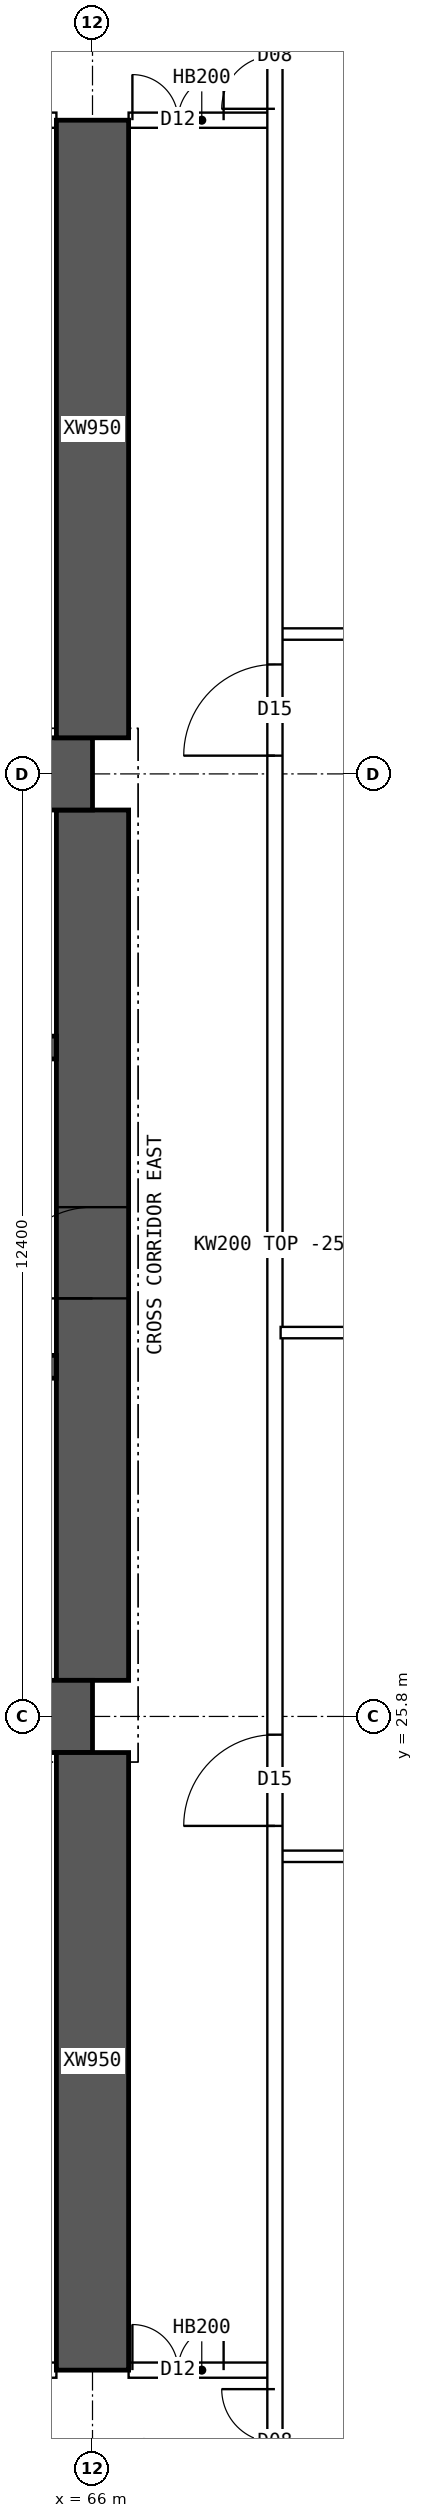
"""IFC4 building model, lengths in metres.
Left out: names, types, materials, properties, quantities, classifications, styles, units other than length and angle.
Written with IfcOpenShell. Run it as: python <this file> out.ifc"""

import sys

from ifc_helpers import new_model, si_unit, direction, frame, frame_2d, origin, place, context, subcontext, project, spatial, polyline, rectangle, outline, extrude, element, fill, save


model = new_model("IFC4")
c1 = context("Model", 3, precision=1e-05, world=origin(), true_north=direction((0.0, 1.0)))
c2 = subcontext(c1, "Body", "Model", "MODEL_VIEW")
j1 = project(units=[si_unit("LENGTHUNIT", "METRE"), si_unit("PLANEANGLEUNIT", "RADIAN")], contexts=[c1])
p1 = place(None, origin())
s1 = spatial("IfcSite", under=j1, at=p1, CompositionType="ELEMENT")
p2 = place(p1, origin())
s2 = spatial("IfcBuilding", under=s1, at=p2, CompositionType="ELEMENT")
p3 = place(p2, frame((0.0, 0.0, 140.35)))
s3 = spatial("IfcBuildingStorey", under=s2, at=p3, CompositionType="ELEMENT", Elevation=140.35)
for number, where, z_axis, x_axis in (
    (1, (18.0, 25.8, 0.0), (0.0, 0.0, 1.0), (1.0, 0.0, 0.0)),
    (2, (18.0, 38.2, 0.0), (0.0, 0.0, 1.0), (1.0, 0.0, 0.0)),
):
    element("IfcWall", number, at=place(p3, frame(where, z_axis=z_axis, x_axis=x_axis)), inside=s3, PredefinedType="SHEAR", context=c2, shape_type="SweptSolid", body=[
        extrude(rectangle(XDim=48.0, YDim=0.95, at=frame_2d((24.0, 0.0))), origin(), (0.0, 0.0, 1.0), 4.5),
    ])
p4 = place(p3, frame((66.0, 26.275, 0.0), z_axis=(0.0, 0.0, 1.0), x_axis=(0.0, 1.0, 0.0)))
e3 = element("IfcWall", 3, at=p4, inside=s3, PredefinedType="SHEAR", context=c2, shape_type="SweptSolid", body=[
    extrude(rectangle(XDim=11.45, YDim=0.95, at=frame_2d((5.725, 0.0))), origin(), (0.0, 0.0, 1.0), 4.5),
])
p5 = place(p4, frame((5.025, 0.0, 0.0)))
e4 = element("IfcOpeningElement", 4, at=p5, cuts=e3, PredefinedType="OPENING", context=c2, shape_type="SweptSolid", body=[
    extrude(rectangle(XDim=1.2, YDim=2.1, at=frame_2d((0.6, 1.05))), frame((0.0, 0.485, 0.0), z_axis=(0.0, -1.0, 0.0), x_axis=(1.0, 0.0, 0.0)), (0.0, 0.0, 1.0), 0.97),
])
p6 = place(p3, frame((18.475, 30.4, 0.0), z_axis=(0.0, 0.0, 1.0), x_axis=(1.0, 0.0, 0.0)))
e5 = element("IfcWall", 5, at=p6, inside=s3, PredefinedType="SHEAR", context=c2, shape_type="SweptSolid", body=[
    extrude(rectangle(XDim=47.05, YDim=0.3, at=frame_2d((23.525, 0.0))), origin(), (0.0, 0.0, 1.0), 4.5),
])
p7 = place(p6, frame((0.4, 0.0, 0.0)))
e6 = element("IfcOpeningElement", 6, at=p7, cuts=e5, PredefinedType="OPENING", context=c2, shape_type="SweptSolid", body=[
    extrude(rectangle(XDim=1.0, YDim=2.1, at=frame_2d((0.5, 1.05))), frame((0.0, 0.16, 0.0), z_axis=(0.0, -1.0, 0.0), x_axis=(1.0, 0.0, 0.0)), (0.0, 0.0, 1.0), 0.32),
])
p8 = place(p6, frame((45.65, 0.0, 0.0)))
e7 = element("IfcOpeningElement", 7, at=p8, cuts=e5, PredefinedType="OPENING", context=c2, shape_type="SweptSolid", body=[
    extrude(rectangle(XDim=1.0, YDim=2.1, at=frame_2d((0.5, 1.05))), frame((0.0, 0.16, 0.0), z_axis=(0.0, -1.0, 0.0), x_axis=(1.0, 0.0, 0.0)), (0.0, 0.0, 1.0), 0.32),
])
p9 = place(p6, frame((8.275, 0.0, 0.0)))
e8 = element("IfcOpeningElement", 8, at=p9, cuts=e5, PredefinedType="OPENING", context=c2, shape_type="SweptSolid", body=[
    extrude(rectangle(XDim=1.1, YDim=2.1, at=frame_2d((0.55, 1.05))), frame((0.0, 0.16, 0.0), z_axis=(0.0, -1.0, 0.0), x_axis=(1.0, 0.0, 0.0)), (0.0, 0.0, 1.0), 0.32),
])
p10 = place(p6, frame((10.875, 0.0, 0.0)))
e9 = element("IfcOpeningElement", 9, at=p10, cuts=e5, PredefinedType="OPENING", context=c2, shape_type="SweptSolid", body=[
    extrude(rectangle(XDim=1.1, YDim=2.1, at=frame_2d((0.55, 1.05))), frame((0.0, 0.16, 0.0), z_axis=(0.0, -1.0, 0.0), x_axis=(1.0, 0.0, 0.0)), (0.0, 0.0, 1.0), 0.32),
])
p11 = place(p6, frame((13.475, 0.0, 0.0)))
e10 = element("IfcOpeningElement", 10, at=p11, cuts=e5, PredefinedType="OPENING", context=c2, shape_type="SweptSolid", body=[
    extrude(rectangle(XDim=1.1, YDim=2.1, at=frame_2d((0.55, 1.05))), frame((0.0, 0.16, 0.0), z_axis=(0.0, -1.0, 0.0), x_axis=(1.0, 0.0, 0.0)), (0.0, 0.0, 1.0), 0.32),
])
p12 = place(p6, frame((16.075, 0.0, 0.0)))
e11 = element("IfcOpeningElement", 11, at=p12, cuts=e5, PredefinedType="OPENING", context=c2, shape_type="SweptSolid", body=[
    extrude(rectangle(XDim=1.1, YDim=2.1, at=frame_2d((0.55, 1.05))), frame((0.0, 0.16, 0.0), z_axis=(0.0, -1.0, 0.0), x_axis=(1.0, 0.0, 0.0)), (0.0, 0.0, 1.0), 0.32),
])
p13 = place(p6, frame((18.85, 0.0, 0.0)))
e12 = element("IfcOpeningElement", 12, at=p13, cuts=e5, PredefinedType="OPENING", context=c2, shape_type="SweptSolid", body=[
    extrude(rectangle(XDim=0.9, YDim=2.1, at=frame_2d((0.45, 1.05))), frame((0.0, 0.16, 0.0), z_axis=(0.0, -1.0, 0.0), x_axis=(1.0, 0.0, 0.0)), (0.0, 0.0, 1.0), 0.32),
])
p14 = place(p6, frame((21.5, 0.0, 0.0)))
e13 = element("IfcOpeningElement", 13, at=p14, cuts=e5, PredefinedType="OPENING", context=c2, shape_type="SweptSolid", body=[
    extrude(rectangle(XDim=1.1, YDim=2.1, at=frame_2d((0.55, 1.05))), frame((0.0, 0.16, 0.0), z_axis=(0.0, -1.0, 0.0), x_axis=(1.0, 0.0, 0.0)), (0.0, 0.0, 1.0), 0.32),
])
p15 = place(p6, frame((30.142, 0.0, 0.0)))
e14 = element("IfcOpeningElement", 14, at=p15, cuts=e5, PredefinedType="OPENING", context=c2, shape_type="SweptSolid", body=[
    extrude(rectangle(XDim=1.1, YDim=2.1, at=frame_2d((0.55, 1.05))), frame((0.0, 0.16, 0.0), z_axis=(0.0, -1.0, 0.0), x_axis=(1.0, 0.0, 0.0)), (0.0, 0.0, 1.0), 0.32),
])
p16 = place(p6, frame((33.675, 0.0, 0.0)))
e15 = element("IfcOpeningElement", 15, at=p16, cuts=e5, PredefinedType="OPENING", context=c2, shape_type="SweptSolid", body=[
    extrude(rectangle(XDim=1.1, YDim=2.1, at=frame_2d((0.55, 1.05))), frame((0.0, 0.16, 0.0), z_axis=(0.0, -1.0, 0.0), x_axis=(1.0, 0.0, 0.0)), (0.0, 0.0, 1.0), 0.32),
])
p17 = place(p6, frame((37.208, 0.0, 0.0)))
e16 = element("IfcOpeningElement", 16, at=p17, cuts=e5, PredefinedType="OPENING", context=c2, shape_type="SweptSolid", body=[
    extrude(rectangle(XDim=1.1, YDim=2.1, at=frame_2d((0.55, 1.05))), frame((0.0, 0.16, 0.0), z_axis=(0.0, -1.0, 0.0), x_axis=(1.0, 0.0, 0.0)), (0.0, 0.0, 1.0), 0.32),
])
p18 = place(p3, frame((18.475, 34.6, 0.0), z_axis=(0.0, 0.0, 1.0), x_axis=(1.0, 0.0, 0.0)))
e17 = element("IfcWall", 17, at=p18, inside=s3, PredefinedType="SHEAR", context=c2, shape_type="SweptSolid", body=[
    extrude(rectangle(XDim=47.05, YDim=0.3, at=frame_2d((23.525, 0.0))), origin(), (0.0, 0.0, 1.0), 4.5),
])
p19 = place(p18, frame((0.9, 0.0, 0.0)))
e18 = element("IfcOpeningElement", 18, at=p19, cuts=e17, PredefinedType="OPENING", context=c2, shape_type="SweptSolid", body=[
    extrude(rectangle(XDim=1.1, YDim=2.1, at=frame_2d((0.55, 1.05))), frame((0.0, 0.16, 0.0), z_axis=(0.0, -1.0, 0.0), x_axis=(1.0, 0.0, 0.0)), (0.0, 0.0, 1.0), 0.32),
])
p20 = place(p18, frame((45.05, 0.0, 0.0)))
e19 = element("IfcOpeningElement", 19, at=p20, cuts=e17, PredefinedType="OPENING", context=c2, shape_type="SweptSolid", body=[
    extrude(rectangle(XDim=1.1, YDim=2.1, at=frame_2d((0.55, 1.05))), frame((0.0, 0.16, 0.0), z_axis=(0.0, -1.0, 0.0), x_axis=(1.0, 0.0, 0.0)), (0.0, 0.0, 1.0), 0.32),
])
p21 = place(p18, frame((4.125, 0.0, 0.0)))
e20 = element("IfcOpeningElement", 20, at=p21, cuts=e17, PredefinedType="OPENING", context=c2, shape_type="SweptSolid", body=[
    extrude(rectangle(XDim=0.9, YDim=2.1, at=frame_2d((0.45, 1.05))), frame((0.0, 0.16, 0.0), z_axis=(0.0, -1.0, 0.0), x_axis=(1.0, 0.0, 0.0)), (0.0, 0.0, 1.0), 0.32),
])
p22 = place(p18, frame((42.025, 0.0, 0.0)))
e21 = element("IfcOpeningElement", 21, at=p22, cuts=e17, PredefinedType="OPENING", context=c2, shape_type="SweptSolid", body=[
    extrude(rectangle(XDim=0.9, YDim=2.1, at=frame_2d((0.45, 1.05))), frame((0.0, 0.16, 0.0), z_axis=(0.0, -1.0, 0.0), x_axis=(1.0, 0.0, 0.0)), (0.0, 0.0, 1.0), 0.32),
])
p23 = place(p18, frame((8.9, 0.0, 0.0)))
e22 = element("IfcOpeningElement", 22, at=p23, cuts=e17, PredefinedType="OPENING", context=c2, shape_type="SweptSolid", body=[
    extrude(rectangle(XDim=0.9, YDim=2.1, at=frame_2d((0.45, 1.05))), frame((0.0, 0.16, 0.0), z_axis=(0.0, -1.0, 0.0), x_axis=(1.0, 0.0, 0.0)), (0.0, 0.0, 1.0), 0.32),
])
p24 = place(p18, frame((12.874, 0.0, 0.0)))
e23 = element("IfcOpeningElement", 23, at=p24, cuts=e17, PredefinedType="OPENING", context=c2, shape_type="SweptSolid", body=[
    extrude(rectangle(XDim=0.9, YDim=2.1, at=frame_2d((0.45, 1.05))), frame((0.0, 0.16, 0.0), z_axis=(0.0, -1.0, 0.0), x_axis=(1.0, 0.0, 0.0)), (0.0, 0.0, 1.0), 0.32),
])
p25 = place(p18, frame((16.521, 0.0, 0.0)))
e24 = element("IfcOpeningElement", 24, at=p25, cuts=e17, PredefinedType="OPENING", context=c2, shape_type="SweptSolid", body=[
    extrude(rectangle(XDim=0.9, YDim=2.1, at=frame_2d((0.45, 1.05))), frame((0.0, 0.16, 0.0), z_axis=(0.0, -1.0, 0.0), x_axis=(1.0, 0.0, 0.0)), (0.0, 0.0, 1.0), 0.32),
])
p26 = place(p18, frame((20.28, 0.0, 0.0)))
e25 = element("IfcOpeningElement", 25, at=p26, cuts=e17, PredefinedType="OPENING", context=c2, shape_type="SweptSolid", body=[
    extrude(rectangle(XDim=0.9, YDim=2.1, at=frame_2d((0.45, 1.05))), frame((0.0, 0.16, 0.0), z_axis=(0.0, -1.0, 0.0), x_axis=(1.0, 0.0, 0.0)), (0.0, 0.0, 1.0), 0.32),
])
p27 = place(p18, frame((24.686, 0.0, 0.0)))
e26 = element("IfcOpeningElement", 26, at=p27, cuts=e17, PredefinedType="OPENING", context=c2, shape_type="SweptSolid", body=[
    extrude(rectangle(XDim=0.9, YDim=2.1, at=frame_2d((0.45, 1.05))), frame((0.0, 0.16, 0.0), z_axis=(0.0, -1.0, 0.0), x_axis=(1.0, 0.0, 0.0)), (0.0, 0.0, 1.0), 0.32),
])
p28 = place(p18, frame((27.483, 0.0, 0.0)))
e27 = element("IfcOpeningElement", 27, at=p28, cuts=e17, PredefinedType="OPENING", context=c2, shape_type="SweptSolid", body=[
    extrude(rectangle(XDim=0.9, YDim=2.1, at=frame_2d((0.45, 1.05))), frame((0.0, 0.16, 0.0), z_axis=(0.0, -1.0, 0.0), x_axis=(1.0, 0.0, 0.0)), (0.0, 0.0, 1.0), 0.32),
])
p29 = place(p18, frame((30.666, 0.0, 0.0)))
e28 = element("IfcOpeningElement", 28, at=p29, cuts=e17, PredefinedType="OPENING", context=c2, shape_type="SweptSolid", body=[
    extrude(rectangle(XDim=0.9, YDim=2.1, at=frame_2d((0.45, 1.05))), frame((0.0, 0.16, 0.0), z_axis=(0.0, -1.0, 0.0), x_axis=(1.0, 0.0, 0.0)), (0.0, 0.0, 1.0), 0.32),
])
p30 = place(p18, frame((34.617, 0.0, 0.0)))
e29 = element("IfcOpeningElement", 29, at=p30, cuts=e17, PredefinedType="OPENING", context=c2, shape_type="SweptSolid", body=[
    extrude(rectangle(XDim=0.9, YDim=2.1, at=frame_2d((0.45, 1.05))), frame((0.0, 0.16, 0.0), z_axis=(0.0, -1.0, 0.0), x_axis=(1.0, 0.0, 0.0)), (0.0, 0.0, 1.0), 0.32),
])
p31 = place(p18, frame((37.555, 0.0, 0.0)))
e30 = element("IfcOpeningElement", 30, at=p31, cuts=e17, PredefinedType="OPENING", context=c2, shape_type="SweptSolid", body=[
    extrude(rectangle(XDim=0.9, YDim=2.1, at=frame_2d((0.45, 1.05))), frame((0.0, 0.16, 0.0), z_axis=(0.0, -1.0, 0.0), x_axis=(1.0, 0.0, 0.0)), (0.0, 0.0, 1.0), 0.32),
])
for number, where, z_axis, x_axis in (
    (31, (66.0, 17.2, 0.0), (0.0, 0.0, 1.0), (0.0, 1.0, 0.0)),
    (32, (66.0, 38.675, 0.0), (0.0, 0.0, 1.0), (0.0, 1.0, 0.0)),
):
    element("IfcWall", number, at=place(p3, frame(where, z_axis=z_axis, x_axis=x_axis)), inside=s3, PredefinedType="SHEAR", context=c2, shape_type="SweptSolid", body=[
        extrude(rectangle(XDim=8.125, YDim=0.95, at=frame_2d((4.062, 0.0))), origin(), (0.0, 0.0, 1.0), 4.5),
    ])
p32 = place(p3, frame((60.475, 17.2, 0.0), z_axis=(0.0, 0.0, 1.0), x_axis=(1.0, 0.0, 0.0)))
e33 = element("IfcWall", 33, at=p32, inside=s3, PredefinedType="SOLIDWALL", context=c2, shape_type="SweptSolid", body=[
    extrude(rectangle(XDim=5.05, YDim=0.2, at=frame_2d((2.525, 0.0))), origin(), (0.0, 0.0, 1.0), 4.25),
])
p33 = place(p32, frame((0.4, 0.0, 0.0)))
e34 = element("IfcOpeningElement", 34, at=p33, cuts=e33, PredefinedType="OPENING", context=c2, shape_type="SweptSolid", body=[
    extrude(rectangle(XDim=1.0, YDim=2.1, at=frame_2d((0.5, 1.05))), frame((0.0, 0.11, 0.0), z_axis=(0.0, -1.0, 0.0), x_axis=(1.0, 0.0, 0.0)), (0.0, 0.0, 1.0), 0.22),
])
p34 = place(p3, frame((66.475, 17.2, 0.0), z_axis=(0.0, 0.0, 1.0), x_axis=(1.0, 0.0, 0.0)))
e35 = element("IfcWall", 35, at=p34, inside=s3, PredefinedType="SOLIDWALL", context=c2, shape_type="SweptSolid", body=[
    extrude(rectangle(XDim=1.925, YDim=0.2, at=frame_2d((0.962, 0.0))), origin(), (0.0, 0.0, 1.0), 4.25),
])
p35 = place(p34, frame((0.05, 0.0, 0.0)))
e36 = element("IfcOpeningElement", 36, at=p35, cuts=e35, PredefinedType="OPENING", context=c2, shape_type="SweptSolid", body=[
    extrude(rectangle(XDim=1.2, YDim=2.1, at=frame_2d((0.6, 1.05))), frame((0.0, 0.11, 0.0), z_axis=(0.0, -1.0, 0.0), x_axis=(1.0, 0.0, 0.0)), (0.0, 0.0, 1.0), 0.22),
])
p36 = place(p3, frame((60.475, 46.8, 0.0), z_axis=(0.0, 0.0, 1.0), x_axis=(1.0, 0.0, 0.0)))
e37 = element("IfcWall", 37, at=p36, inside=s3, PredefinedType="SOLIDWALL", context=c2, shape_type="SweptSolid", body=[
    extrude(rectangle(XDim=5.05, YDim=0.2, at=frame_2d((2.525, 0.0))), origin(), (0.0, 0.0, 1.0), 4.25),
])
p37 = place(p36, frame((0.15, 0.0, 0.0)))
e38 = element("IfcOpeningElement", 38, at=p37, cuts=e37, PredefinedType="OPENING", context=c2, shape_type="SweptSolid", body=[
    extrude(rectangle(XDim=0.9, YDim=2.1, at=frame_2d((0.45, 1.05))), frame((0.0, 0.11, 0.0), z_axis=(0.0, -1.0, 0.0), x_axis=(1.0, 0.0, 0.0)), (0.0, 0.0, 1.0), 0.22),
])
p38 = place(p36, frame((3.185, 0.0, 0.0)))
e39 = element("IfcOpeningElement", 39, at=p38, cuts=e37, PredefinedType="OPENING", context=c2, shape_type="SweptSolid", body=[
    extrude(rectangle(XDim=0.9, YDim=2.1, at=frame_2d((0.45, 1.05))), frame((0.0, 0.11, 0.0), z_axis=(0.0, -1.0, 0.0), x_axis=(1.0, 0.0, 0.0)), (0.0, 0.0, 1.0), 0.22),
])
p39 = place(p3, frame((66.475, 46.8, 0.0), z_axis=(0.0, 0.0, 1.0), x_axis=(1.0, 0.0, 0.0)))
e40 = element("IfcWall", 40, at=p39, inside=s3, PredefinedType="SOLIDWALL", context=c2, shape_type="SweptSolid", body=[
    extrude(rectangle(XDim=1.925, YDim=0.2, at=frame_2d((0.962, 0.0))), origin(), (0.0, 0.0, 1.0), 4.25),
])
p40 = place(p39, frame((0.05, 0.0, 0.0)))
e41 = element("IfcOpeningElement", 41, at=p40, cuts=e40, PredefinedType="OPENING", context=c2, shape_type="SweptSolid", body=[
    extrude(rectangle(XDim=1.2, YDim=2.1, at=frame_2d((0.6, 1.05))), frame((0.0, 0.11, 0.0), z_axis=(0.0, -1.0, 0.0), x_axis=(1.0, 0.0, 0.0)), (0.0, 0.0, 1.0), 0.22),
])
p41 = place(p3, frame((68.475, 30.85, 0.0), z_axis=(0.0, 0.0, 1.0), x_axis=(1.0, 0.0, 0.0)))
e42 = element("IfcWall", 42, at=p41, inside=s3, PredefinedType="PARTITIONING", context=c2, shape_type="SweptSolid", body=[
    extrude(outline(polyline([(0.0, 0.0), (6.82, 0.0), (6.82, 4.25), (3.827, 4.25), (3.825, 3.8), (3.227, 3.8), (3.225, 4.25), (0.0, 4.25), (0.0, 0.0)])), frame((0.0, 0.075, 0.0), z_axis=(0.0, -1.0, 0.0), x_axis=(1.0, 0.0, 0.0)), (0.0, 0.0, 1.0), 0.15),
])
p42 = place(p3, frame((68.4, 10.446, 0.0), z_axis=(0.0, 0.0, 1.0), x_axis=(0.0, 1.0, 0.0)))
e43 = element("IfcWall", 43, at=p42, inside=s3, PredefinedType="SOLIDWALL", context=c2, shape_type="SweptSolid", body=[
    extrude(rectangle(XDim=43.107, YDim=0.2, at=frame_2d((21.554, 0.0))), origin(), (0.0, 0.0, 1.0), 4.25),
])
p43 = place(p42, frame((13.914, 0.0, 0.0)))
e44 = element("IfcOpeningElement", 44, at=p43, cuts=e43, PredefinedType="OPENING", context=c2, shape_type="SweptSolid", body=[
    extrude(rectangle(XDim=1.2, YDim=2.1, at=frame_2d((0.6, 1.05))), frame((0.0, 0.11, 0.0), z_axis=(0.0, -1.0, 0.0), x_axis=(1.0, 0.0, 0.0)), (0.0, 0.0, 1.0), 0.22),
])
p44 = place(p42, frame((27.994, 0.0, 0.0)))
e45 = element("IfcOpeningElement", 45, at=p44, cuts=e43, PredefinedType="OPENING", context=c2, shape_type="SweptSolid", body=[
    extrude(rectangle(XDim=1.2, YDim=2.1, at=frame_2d((0.6, 1.05))), frame((0.0, 0.11, 0.0), z_axis=(0.0, -1.0, 0.0), x_axis=(1.0, 0.0, 0.0)), (0.0, 0.0, 1.0), 0.22),
])
p45 = place(p42, frame((5.104, 0.0, 0.0)))
e46 = element("IfcOpeningElement", 46, at=p45, cuts=e43, PredefinedType="OPENING", context=c2, shape_type="SweptSolid", body=[
    extrude(rectangle(XDim=1.4, YDim=2.1, at=frame_2d((0.7, 1.05))), frame((0.0, 0.11, 0.0), z_axis=(0.0, -1.0, 0.0), x_axis=(1.0, 0.0, 0.0)), (0.0, 0.0, 1.0), 0.22),
])
p46 = place(p42, frame((36.504, 0.0, 0.0)))
e47 = element("IfcOpeningElement", 47, at=p46, cuts=e43, PredefinedType="OPENING", context=c2, shape_type="SweptSolid", body=[
    extrude(rectangle(XDim=1.4, YDim=2.1, at=frame_2d((0.7, 1.05))), frame((0.0, 0.11, 0.0), z_axis=(0.0, -1.0, 0.0), x_axis=(1.0, 0.0, 0.0)), (0.0, 0.0, 1.0), 0.22),
])
for number, where, z_axis, x_axis in (
    (48, (68.475, 23.96, 0.0), (0.0, 0.0, 1.0), (1.0, 0.0, 0.0)),
    (49, (68.475, 40.04, 0.0), (0.0, 0.0, 1.0), (1.0, 0.0, 0.0)),
):
    element("IfcWall", number, at=place(p3, frame(where, z_axis=z_axis, x_axis=x_axis)), inside=s3, PredefinedType="PARTITIONING", context=c2, shape_type="SweptSolid", body=[
        extrude(rectangle(XDim=6.82, YDim=0.15, at=frame_2d((3.41, 0.0))), origin(), (0.0, 0.0, 1.0), 4.25),
    ])
p47 = place(p5, origin())
e50 = element("IfcDoor", 50, at=p47, inside=s3, OperationType="SINGLE_SWING_LEFT", PredefinedType="DOOR", context=c2, shape_type="SweptSolid", body=[
    extrude(rectangle(XDim=1.2, YDim=2.1, at=frame_2d((0.6, 1.05))), frame((0.0, 0.025, 0.0), z_axis=(0.0, -1.0, 0.0), x_axis=(1.0, 0.0, 0.0)), (0.0, 0.0, 1.0), 0.05),
])
fill(e4, e50)
p48 = place(p35, origin())
e51 = element("IfcDoor", 51, at=p48, inside=s3, OperationType="DOUBLE_DOOR_SINGLE_SWING", PredefinedType="DOOR", context=c2, shape_type="SweptSolid", body=[
    extrude(rectangle(XDim=1.2, YDim=2.1, at=frame_2d((0.6, 1.05))), frame((0.0, 0.025, 0.0), z_axis=(0.0, -1.0, 0.0), x_axis=(1.0, 0.0, 0.0)), (0.0, 0.0, 1.0), 0.05),
])
fill(e36, e51)
p49 = place(p40, origin())
e52 = element("IfcDoor", 52, at=p49, inside=s3, OperationType="DOUBLE_DOOR_SINGLE_SWING", PredefinedType="DOOR", context=c2, shape_type="SweptSolid", body=[
    extrude(rectangle(XDim=1.2, YDim=2.1, at=frame_2d((0.6, 1.05))), frame((0.0, 0.025, 0.0), z_axis=(0.0, -1.0, 0.0), x_axis=(1.0, 0.0, 0.0)), (0.0, 0.0, 1.0), 0.05),
])
fill(e41, e52)
p50 = place(p43, origin())
e53 = element("IfcDoor", 53, at=p50, inside=s3, OperationType="SINGLE_SWING_LEFT", PredefinedType="DOOR", context=c2, shape_type="SweptSolid", body=[
    extrude(rectangle(XDim=1.2, YDim=2.1, at=frame_2d((0.6, 1.05))), frame((0.0, 0.025, 0.0), z_axis=(0.0, -1.0, 0.0), x_axis=(1.0, 0.0, 0.0)), (0.0, 0.0, 1.0), 0.05),
])
fill(e44, e53)
p51 = place(p44, origin())
e54 = element("IfcDoor", 54, at=p51, inside=s3, OperationType="SINGLE_SWING_LEFT", PredefinedType="DOOR", context=c2, shape_type="SweptSolid", body=[
    extrude(rectangle(XDim=1.2, YDim=2.1, at=frame_2d((0.6, 1.05))), frame((0.0, 0.025, 0.0), z_axis=(0.0, -1.0, 0.0), x_axis=(1.0, 0.0, 0.0)), (0.0, 0.0, 1.0), 0.05),
])
fill(e45, e54)
p52 = place(p45, origin())
e55 = element("IfcDoor", 55, at=p52, inside=s3, OperationType="DOUBLE_DOOR_SINGLE_SWING", PredefinedType="DOOR", context=c2, shape_type="SweptSolid", body=[
    extrude(rectangle(XDim=1.4, YDim=2.1, at=frame_2d((0.7, 1.05))), frame((0.0, 0.025, 0.0), z_axis=(0.0, -1.0, 0.0), x_axis=(1.0, 0.0, 0.0)), (0.0, 0.0, 1.0), 0.05),
])
fill(e46, e55)
p53 = place(p46, origin())
e56 = element("IfcDoor", 56, at=p53, inside=s3, OperationType="DOUBLE_DOOR_SINGLE_SWING", PredefinedType="DOOR", context=c2, shape_type="SweptSolid", body=[
    extrude(rectangle(XDim=1.4, YDim=2.1, at=frame_2d((0.7, 1.05))), frame((0.0, 0.025, 0.0), z_axis=(0.0, -1.0, 0.0), x_axis=(1.0, 0.0, 0.0)), (0.0, 0.0, 1.0), 0.05),
])
fill(e47, e56)
save(model, sys.argv[1])
